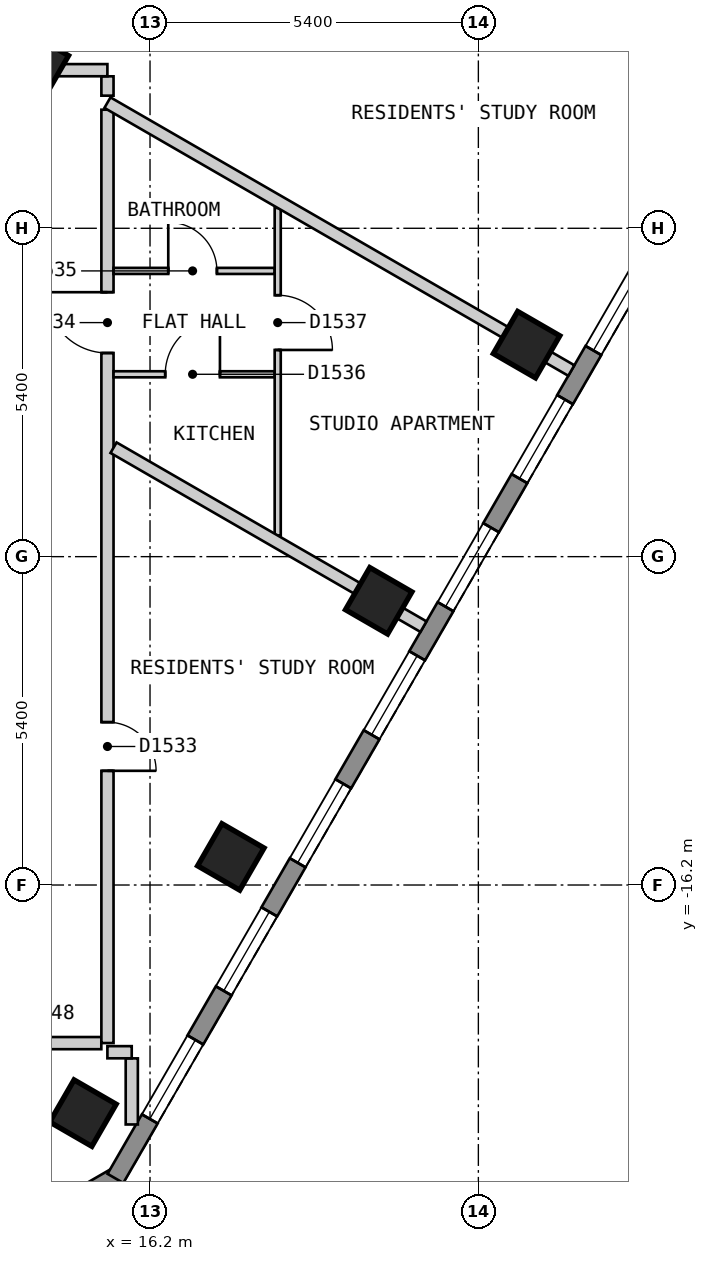
"""IFC4 building model, lengths in metres.
Left out: names, types, materials, properties, quantities, classifications, styles, units other than length and angle.
Written with IfcOpenShell. Run it as: python <this file> out.ifc"""

import sys

from ifc_helpers import new_model, si_unit, direction, frame, frame_2d, origin, origin_2d, place, context, subcontext, project, spatial, polyline, rectangle, outline, extrude, element, fill, save


model = new_model("IFC4")
c1 = context("Model", 3, precision=1e-05, world=origin(), true_north=direction((0.0, 1.0)))
c2 = subcontext(c1, "Body", "Model", "MODEL_VIEW")
j1 = project(units=[si_unit("LENGTHUNIT", "METRE"), si_unit("PLANEANGLEUNIT", "RADIAN")], contexts=[c1])
p1 = place(None, origin())
s1 = spatial("IfcSite", under=j1, at=p1, CompositionType="ELEMENT")
p2 = place(p1, origin())
s2 = spatial("IfcBuilding", under=s1, at=p2, CompositionType="ELEMENT")
p3 = place(p2, frame((0.0, 0.0, 190.2)))
s3 = spatial("IfcBuildingStorey", under=s2, at=p3, CompositionType="ELEMENT", Elevation=190.2)
for number, where, z_axis, x_axis in (
    (1, (15.097, -19.951, 0.0), (0.0, 0.0, 1.0), (0.5, 0.866, 0.0)),
    (2, (17.529, -15.738, 0.0), (0.0, 0.0, 1.0), (0.5, 0.866, 0.0)),
    (3, (19.961, -11.526, 0.0), (0.0, 0.0, 1.0), (0.5, 0.866, 0.0)),
    (4, (22.393, -7.314, 0.0), (0.0, 0.0, 1.0), (0.5, 0.866, 0.0)),
):
    element("IfcColumn", number, at=place(p3, frame(where, z_axis=z_axis, x_axis=x_axis)), inside=s3, PredefinedType="COLUMN", context=c2, shape_type="SweptSolid", body=[
        extrude(rectangle(XDim=0.8, YDim=0.8, at=origin_2d()), origin(), (0.0, 0.0, 1.0), 3.0),
    ])
p4 = place(p3, frame((14.382, -2.689, 0.0), z_axis=(0.0, 0.0, 1.0), x_axis=(0.5, 0.866025403784, 0.0)))
e5 = element("IfcColumn", 5, at=p4, inside=s3, PredefinedType="COLUMN", context=c2, shape_type="SweptSolid", body=[
    extrude(rectangle(XDim=0.7, YDim=0.7, at=origin_2d()), origin(), (0.0, 0.0, 1.0), 3.0),
])
p5 = place(p3, frame((11.356, -23.47, 0.0), z_axis=(0.0, 0.0, 1.0), x_axis=(0.866022959057, 0.500004234368, 0.0)))
e6 = element("IfcWall", 6, at=p5, inside=s3, PredefinedType="SOLIDWALL", context=c2, shape_type="SweptSolid", body=[
    extrude(outline(polyline([(0.0, -0.15), (5.0, -0.15), (4.92, 0.15), (0.08, 0.15), (0.0, -0.15)])), origin(), (0.0, 0.0, 1.0), 2.7),
])
p6 = place(p5, frame((0.65, 0.0, 0.15)))
e7 = element("IfcOpeningElement", 7, at=p6, cuts=e6, PredefinedType="OPENING", context=c2, shape_type="SweptSolid", body=[
    extrude(rectangle(XDim=1.2, YDim=2.1, at=frame_2d((0.6, 1.05))), frame((0.0, 0.16, 0.0), z_axis=(0.0, -1.0, 0.0), x_axis=(1.0, 0.0, 0.0)), (0.0, 0.0, 1.0), 0.32),
])
p7 = place(p5, frame((3.149, 0.0, 0.15)))
e8 = element("IfcOpeningElement", 8, at=p7, cuts=e6, PredefinedType="OPENING", context=c2, shape_type="SweptSolid", body=[
    extrude(rectangle(XDim=1.2, YDim=2.1, at=frame_2d((0.6, 1.05))), frame((0.0, 0.16, 0.0), z_axis=(0.0, -1.0, 0.0), x_axis=(1.0, 0.0, 0.0)), (0.0, 0.0, 1.0), 0.32),
])
p8 = place(p3, frame((15.631, -21.025, 0.0), z_axis=(0.0, 0.0, 1.0), x_axis=(0.500018670445, 0.86601462413, 0.0)))
e9 = element("IfcWall", 9, at=p8, inside=s3, PredefinedType="SOLIDWALL", context=c2, shape_type="SweptSolid", body=[
    extrude(outline(polyline([(0.0, -0.15), (20.785, -0.15), (20.705, 0.15), (0.08, 0.15), (0.0, -0.15)])), origin(), (0.0, 0.0, 1.0), 2.7),
])
p9 = place(p8, frame((1.13, 0.0, 0.15)))
e10 = element("IfcOpeningElement", 10, at=p9, cuts=e9, PredefinedType="OPENING", context=c2, shape_type="SweptSolid", body=[
    extrude(rectangle(XDim=1.5, YDim=2.1, at=frame_2d((0.75, 1.05))), frame((0.0, 0.16, 0.0), z_axis=(0.0, -1.0, 0.0), x_axis=(1.0, 0.0, 0.0)), (0.0, 0.0, 1.0), 0.32),
])
p10 = place(p8, frame((3.562, 0.0, 0.15)))
e11 = element("IfcOpeningElement", 11, at=p10, cuts=e9, PredefinedType="OPENING", context=c2, shape_type="SweptSolid", body=[
    extrude(rectangle(XDim=1.5, YDim=2.1, at=frame_2d((0.75, 1.05))), frame((0.0, 0.16, 0.0), z_axis=(0.0, -1.0, 0.0), x_axis=(1.0, 0.0, 0.0)), (0.0, 0.0, 1.0), 0.32),
])
p11 = place(p8, frame((5.994, 0.0, 0.15)))
e12 = element("IfcOpeningElement", 12, at=p11, cuts=e9, PredefinedType="OPENING", context=c2, shape_type="SweptSolid", body=[
    extrude(rectangle(XDim=1.5, YDim=2.1, at=frame_2d((0.75, 1.05))), frame((0.0, 0.16, 0.0), z_axis=(0.0, -1.0, 0.0), x_axis=(1.0, 0.0, 0.0)), (0.0, 0.0, 1.0), 0.32),
])
p12 = place(p8, frame((8.425, 0.0, 0.15)))
e13 = element("IfcOpeningElement", 13, at=p12, cuts=e9, PredefinedType="OPENING", context=c2, shape_type="SweptSolid", body=[
    extrude(rectangle(XDim=1.5, YDim=2.1, at=frame_2d((0.75, 1.05))), frame((0.0, 0.16, 0.0), z_axis=(0.0, -1.0, 0.0), x_axis=(1.0, 0.0, 0.0)), (0.0, 0.0, 1.0), 0.32),
])
p13 = place(p8, frame((10.857, 0.0, 0.15)))
e14 = element("IfcOpeningElement", 14, at=p13, cuts=e9, PredefinedType="OPENING", context=c2, shape_type="SweptSolid", body=[
    extrude(rectangle(XDim=1.5, YDim=2.1, at=frame_2d((0.75, 1.05))), frame((0.0, 0.16, 0.0), z_axis=(0.0, -1.0, 0.0), x_axis=(1.0, 0.0, 0.0)), (0.0, 0.0, 1.0), 0.32),
])
p14 = place(p8, frame((13.289, 0.0, 0.15)))
e15 = element("IfcOpeningElement", 15, at=p14, cuts=e9, PredefinedType="OPENING", context=c2, shape_type="SweptSolid", body=[
    extrude(rectangle(XDim=1.5, YDim=2.1, at=frame_2d((0.75, 1.05))), frame((0.0, 0.16, 0.0), z_axis=(0.0, -1.0, 0.0), x_axis=(1.0, 0.0, 0.0)), (0.0, 0.0, 1.0), 0.32),
])
p15 = place(p8, frame((15.722, 0.0, 0.15)))
e16 = element("IfcOpeningElement", 16, at=p15, cuts=e9, PredefinedType="OPENING", context=c2, shape_type="SweptSolid", body=[
    extrude(rectangle(XDim=1.5, YDim=2.1, at=frame_2d((0.75, 1.05))), frame((0.0, 0.16, 0.0), z_axis=(0.0, -1.0, 0.0), x_axis=(1.0, 0.0, 0.0)), (0.0, 0.0, 1.0), 0.32),
])
p16 = place(p8, frame((18.154, 0.0, 0.15)))
e17 = element("IfcOpeningElement", 17, at=p16, cuts=e9, PredefinedType="OPENING", context=c2, shape_type="SweptSolid", body=[
    extrude(rectangle(XDim=1.5, YDim=2.1, at=frame_2d((0.75, 1.05))), frame((0.0, 0.16, 0.0), z_axis=(0.0, -1.0, 0.0), x_axis=(1.0, 0.0, 0.0)), (0.0, 0.0, 1.0), 0.32),
])
p17 = place(p3, frame((15.5, -2.901, 0.0), z_axis=(0.0, 0.0, 1.0), x_axis=(0.0, -1.0, 0.0)))
e18 = element("IfcWall", 18, at=p17, inside=s3, PredefinedType="PARTITIONING", context=c2, shape_type="SweptSolid", body=[
    extrude(rectangle(XDim=0.318, YDim=0.2, at=frame_2d((0.159, 0.0))), origin(), (0.0, 0.0, 1.0), 2.7),
])
p18 = place(p3, frame((13.3, -18.8, 0.0), z_axis=(0.0, 0.0, 1.0), x_axis=(1.0, 0.0, 0.0)))
e19 = element("IfcWall", 19, at=p18, inside=s3, PredefinedType="PARTITIONING", context=c2, shape_type="SweptSolid", body=[
    extrude(rectangle(XDim=2.099, YDim=0.2, at=frame_2d((1.049, 0.0))), origin(), (0.0, 0.0, 1.0), 2.7),
])
p19 = place(p18, frame((0.2, 0.0, 0.0)))
e20 = element("IfcOpeningElement", 20, at=p19, cuts=e19, PredefinedType="OPENING", context=c2, shape_type="SweptSolid", body=[
    extrude(rectangle(XDim=1.0, YDim=2.1, at=frame_2d((0.5, 1.05))), frame((0.0, 0.11, 0.0), z_axis=(0.0, -1.0, 0.0), x_axis=(1.0, 0.0, 0.0)), (0.0, 0.0, 1.0), 0.22),
])
p20 = place(p3, frame((14.433, -2.8, 0.0), z_axis=(0.0, 0.0, 1.0), x_axis=(1.0, 0.0, 0.0)))
e21 = element("IfcWall", 21, at=p20, inside=s3, PredefinedType="PARTITIONING", context=c2, shape_type="SweptSolid", body=[
    extrude(rectangle(XDim=1.066, YDim=0.2, at=frame_2d((0.533, 0.0))), origin(), (0.0, 0.0, 1.0), 2.7),
])
p21 = place(p3, frame((14.318, -2.8, 0.0), z_axis=(0.0, 0.0, 1.0), x_axis=(0.49964693309, 0.866229151122, 0.0)))
e22 = element("IfcWall", 22, at=p21, inside=s3, PredefinedType="PARTITIONING", context=c2, shape_type="SweptSolid", body=[
    extrude(rectangle(XDim=2.426, YDim=0.2, at=frame_2d((1.213, 0.0))), origin(), (0.0, 0.0, 1.0), 2.7),
])
p22 = place(p21, frame((0.886, 0.0, 0.0)))
e23 = element("IfcOpeningElement", 23, at=p22, cuts=e22, PredefinedType="OPENING", context=c2, shape_type="SweptSolid", body=[
    extrude(rectangle(XDim=0.8, YDim=2.1, at=frame_2d((0.4, 1.05))), frame((0.0, 0.11, 0.0), z_axis=(0.0, -1.0, 0.0), x_axis=(1.0, 0.0, 0.0)), (0.0, 0.0, 1.0), 0.22),
])
p23 = place(p3, frame((15.5, -18.799, 0.0), z_axis=(0.0, 0.0, 1.0), x_axis=(0.0, 1.0, 0.0)))
e24 = element("IfcWall", 24, at=p23, inside=s3, PredefinedType="PARTITIONING", context=c2, shape_type="SweptSolid", body=[
    extrude(rectangle(XDim=15.349, YDim=0.2, at=frame_2d((7.675, 0.0))), origin(), (0.0, 0.0, 1.0), 2.7),
])
p24 = place(p23, frame((4.477, 0.0, 0.0)))
e25 = element("IfcOpeningElement", 25, at=p24, cuts=e24, PredefinedType="OPENING", context=c2, shape_type="SweptSolid", body=[
    extrude(rectangle(XDim=0.8, YDim=2.1, at=frame_2d((0.4, 1.05))), frame((0.0, 0.11, 0.0), z_axis=(0.0, -1.0, 0.0), x_axis=(1.0, 0.0, 0.0)), (0.0, 0.0, 1.0), 0.22),
])
p25 = place(p23, frame((11.348, 0.0, 0.0)))
e26 = element("IfcOpeningElement", 26, at=p25, cuts=e24, PredefinedType="OPENING", context=c2, shape_type="SweptSolid", body=[
    extrude(rectangle(XDim=1.0, YDim=2.1, at=frame_2d((0.5, 1.05))), frame((0.0, 0.11, 0.0), z_axis=(0.0, -1.0, 0.0), x_axis=(1.0, 0.0, 0.0)), (0.0, 0.0, 1.0), 0.22),
])
p26 = place(p3, frame((15.6, -6.101, 0.0), z_axis=(0.0, 0.0, 1.0), x_axis=(1.0, 0.0, 0.0)))
e27 = element("IfcWall", 27, at=p26, inside=s3, PredefinedType="PARTITIONING", context=c2, shape_type="SweptSolid", body=[
    extrude(rectangle(XDim=2.65, YDim=0.1, at=frame_2d((1.325, 0.0))), origin(), (0.0, 0.0, 1.0), 2.7),
])
p27 = place(p26, frame((0.9, 0.0, 0.0)))
e28 = element("IfcOpeningElement", 28, at=p27, cuts=e27, PredefinedType="OPENING", context=c2, shape_type="SweptSolid", body=[
    extrude(rectangle(XDim=0.8, YDim=2.1, at=frame_2d((0.4, 1.05))), frame((0.0, 0.06, 0.0), z_axis=(0.0, -1.0, 0.0), x_axis=(1.0, 0.0, 0.0)), (0.0, 0.0, 1.0), 0.12),
])
p28 = place(p3, frame((15.6, -7.801, 0.0), z_axis=(0.0, 0.0, 1.0), x_axis=(1.0, 0.0, 0.0)))
e29 = element("IfcWall", 29, at=p28, inside=s3, PredefinedType="PARTITIONING", context=c2, shape_type="SweptSolid", body=[
    extrude(rectangle(XDim=2.65, YDim=0.1, at=frame_2d((1.325, 0.0))), origin(), (0.0, 0.0, 1.0), 2.7),
])
p29 = place(p28, frame((0.85, 0.0, 0.0)))
e30 = element("IfcOpeningElement", 30, at=p29, cuts=e29, PredefinedType="OPENING", context=c2, shape_type="SweptSolid", body=[
    extrude(rectangle(XDim=0.9, YDim=2.1, at=frame_2d((0.45, 1.05))), frame((0.0, 0.06, 0.0), z_axis=(0.0, -1.0, 0.0), x_axis=(1.0, 0.0, 0.0)), (0.0, 0.0, 1.0), 0.12),
])
p30 = place(p3, frame((18.3, -10.452, 0.0), z_axis=(0.0, 0.0, 1.0), x_axis=(0.0, 1.0, 0.0)))
e31 = element("IfcWall", 31, at=p30, inside=s3, PredefinedType="PARTITIONING", context=c2, shape_type="SweptSolid", body=[
    extrude(rectangle(XDim=5.386, YDim=0.1, at=frame_2d((2.693, 0.0))), origin(), (0.0, 0.0, 1.0), 2.7),
])
p31 = place(p30, frame((3.051, 0.0, 0.0)))
e32 = element("IfcOpeningElement", 32, at=p31, cuts=e31, PredefinedType="OPENING", context=c2, shape_type="SweptSolid", body=[
    extrude(rectangle(XDim=0.9, YDim=2.1, at=frame_2d((0.45, 1.05))), frame((0.0, 0.06, 0.0), z_axis=(0.0, -1.0, 0.0), x_axis=(1.0, 0.0, 0.0)), (0.0, 0.0, 1.0), 0.12),
])
p32 = place(p3, frame((15.9, -19.051, 0.0), z_axis=(0.0, 0.0, 1.0), x_axis=(0.0, -1.0, 0.0)))
e33 = element("IfcWall", 33, at=p32, inside=s3, PredefinedType="PARTITIONING", context=c2, shape_type="SweptSolid", body=[
    extrude(rectangle(XDim=1.087, YDim=0.2, at=frame_2d((0.543, 0.0))), origin(), (0.0, 0.0, 1.0), 2.7),
])
p33 = place(p3, frame((15.6, -9.008, 0.0), z_axis=(0.0, 0.0, 1.0), x_axis=(0.866013576751, -0.500020484464, 0.0)))
e34 = element("IfcWall", 34, at=p33, inside=s3, PredefinedType="PARTITIONING", context=c2, shape_type="SweptSolid", body=[
    extrude(rectangle(XDim=5.885, YDim=0.2, at=frame_2d((2.943, 0.0))), origin(), (0.0, 0.0, 1.0), 2.7),
])
p34 = place(p3, frame((15.5, -3.334, 0.0), z_axis=(0.0, 0.0, 1.0), x_axis=(0.866001896501, -0.5000407136, 0.0)))
e35 = element("IfcWall", 35, at=p34, inside=s3, PredefinedType="PARTITIONING", context=c2, shape_type="SweptSolid", body=[
    extrude(rectangle(XDim=8.809, YDim=0.2, at=frame_2d((4.405, 0.0))), origin(), (0.0, 0.0, 1.0), 2.7),
])
p35 = place(p3, frame((15.499, -18.95, 0.0), z_axis=(0.0, 0.0, 1.0), x_axis=(1.0, 0.0, 0.0)))
e36 = element("IfcWall", 36, at=p35, inside=s3, PredefinedType="PARTITIONING", context=c2, shape_type="SweptSolid", body=[
    extrude(rectangle(XDim=0.4, YDim=0.2, at=frame_2d((0.2, 0.0))), origin(), (0.0, 0.0, 1.0), 2.7),
])
p36 = place(p9, origin())
e37 = element("IfcWindow", 37, at=p36, inside=s3, PartitioningType="SINGLE_PANEL", PredefinedType="WINDOW", context=c2, shape_type="SweptSolid", body=[
    extrude(rectangle(XDim=1.5, YDim=2.1, at=frame_2d((0.75, 1.05))), frame((0.0, 0.03, 0.0), z_axis=(0.0, -1.0, 0.0), x_axis=(1.0, 0.0, 0.0)), (0.0, 0.0, 1.0), 0.06),
])
fill(e10, e37)
p37 = place(p10, origin())
e38 = element("IfcWindow", 38, at=p37, inside=s3, PartitioningType="SINGLE_PANEL", PredefinedType="WINDOW", context=c2, shape_type="SweptSolid", body=[
    extrude(rectangle(XDim=1.5, YDim=2.1, at=frame_2d((0.75, 1.05))), frame((0.0, 0.03, 0.0), z_axis=(0.0, -1.0, 0.0), x_axis=(1.0, 0.0, 0.0)), (0.0, 0.0, 1.0), 0.06),
])
fill(e11, e38)
p38 = place(p11, origin())
e39 = element("IfcWindow", 39, at=p38, inside=s3, PartitioningType="SINGLE_PANEL", PredefinedType="WINDOW", context=c2, shape_type="SweptSolid", body=[
    extrude(rectangle(XDim=1.5, YDim=2.1, at=frame_2d((0.75, 1.05))), frame((0.0, 0.03, 0.0), z_axis=(0.0, -1.0, 0.0), x_axis=(1.0, 0.0, 0.0)), (0.0, 0.0, 1.0), 0.06),
])
fill(e12, e39)
p39 = place(p12, origin())
e40 = element("IfcWindow", 40, at=p39, inside=s3, PartitioningType="SINGLE_PANEL", PredefinedType="WINDOW", context=c2, shape_type="SweptSolid", body=[
    extrude(rectangle(XDim=1.5, YDim=2.1, at=frame_2d((0.75, 1.05))), frame((0.0, 0.03, 0.0), z_axis=(0.0, -1.0, 0.0), x_axis=(1.0, 0.0, 0.0)), (0.0, 0.0, 1.0), 0.06),
])
fill(e13, e40)
p40 = place(p13, origin())
e41 = element("IfcWindow", 41, at=p40, inside=s3, PartitioningType="SINGLE_PANEL", PredefinedType="WINDOW", context=c2, shape_type="SweptSolid", body=[
    extrude(rectangle(XDim=1.5, YDim=2.1, at=frame_2d((0.75, 1.05))), frame((0.0, 0.03, 0.0), z_axis=(0.0, -1.0, 0.0), x_axis=(1.0, 0.0, 0.0)), (0.0, 0.0, 1.0), 0.06),
])
fill(e14, e41)
p41 = place(p14, origin())
e42 = element("IfcWindow", 42, at=p41, inside=s3, PartitioningType="SINGLE_PANEL", PredefinedType="WINDOW", context=c2, shape_type="SweptSolid", body=[
    extrude(rectangle(XDim=1.5, YDim=2.1, at=frame_2d((0.75, 1.05))), frame((0.0, 0.03, 0.0), z_axis=(0.0, -1.0, 0.0), x_axis=(1.0, 0.0, 0.0)), (0.0, 0.0, 1.0), 0.06),
])
fill(e15, e42)
p42 = place(p15, origin())
e43 = element("IfcWindow", 43, at=p42, inside=s3, PartitioningType="SINGLE_PANEL", PredefinedType="WINDOW", context=c2, shape_type="SweptSolid", body=[
    extrude(rectangle(XDim=1.5, YDim=2.1, at=frame_2d((0.75, 1.05))), frame((0.0, 0.03, 0.0), z_axis=(0.0, -1.0, 0.0), x_axis=(1.0, 0.0, 0.0)), (0.0, 0.0, 1.0), 0.06),
])
fill(e16, e43)
p43 = place(p24, origin())
e44 = element("IfcDoor", 44, at=p43, inside=s3, OperationType="SINGLE_SWING_LEFT", PredefinedType="DOOR", context=c2, shape_type="SweptSolid", body=[
    extrude(rectangle(XDim=0.8, YDim=2.1, at=frame_2d((0.4, 1.05))), frame((0.0, 0.025, 0.0), z_axis=(0.0, -1.0, 0.0), x_axis=(1.0, 0.0, 0.0)), (0.0, 0.0, 1.0), 0.05),
])
fill(e25, e44)
p44 = place(p25, origin())
e45 = element("IfcDoor", 45, at=p44, inside=s3, OperationType="SINGLE_SWING_RIGHT", PredefinedType="DOOR", context=c2, shape_type="SweptSolid", body=[
    extrude(rectangle(XDim=1.0, YDim=2.1, at=frame_2d((0.5, 1.05))), frame((0.0, 0.025, 0.0), z_axis=(0.0, -1.0, 0.0), x_axis=(1.0, 0.0, 0.0)), (0.0, 0.0, 1.0), 0.05),
])
fill(e26, e45)
p45 = place(p27, origin())
e46 = element("IfcDoor", 46, at=p45, inside=s3, OperationType="SINGLE_SWING_LEFT", PredefinedType="DOOR", context=c2, shape_type="SweptSolid", body=[
    extrude(rectangle(XDim=0.8, YDim=2.1, at=frame_2d((0.4, 1.05))), frame((0.0, 0.025, 0.0), z_axis=(0.0, -1.0, 0.0), x_axis=(1.0, 0.0, 0.0)), (0.0, 0.0, 1.0), 0.05),
])
fill(e28, e46)
p46 = place(p29, origin())
e47 = element("IfcDoor", 47, at=p46, inside=s3, OperationType="SINGLE_SWING_RIGHT", PredefinedType="DOOR", context=c2, shape_type="SweptSolid", body=[
    extrude(rectangle(XDim=0.9, YDim=2.1, at=frame_2d((0.45, 1.05))), frame((0.0, 0.025, 0.0), z_axis=(0.0, -1.0, 0.0), x_axis=(1.0, 0.0, 0.0)), (0.0, 0.0, 1.0), 0.05),
])
fill(e30, e47)
p47 = place(p31, origin())
e48 = element("IfcDoor", 48, at=p47, inside=s3, OperationType="SINGLE_SWING_LEFT", PredefinedType="DOOR", context=c2, shape_type="SweptSolid", body=[
    extrude(rectangle(XDim=0.9, YDim=2.1, at=frame_2d((0.45, 1.05))), frame((0.0, 0.025, 0.0), z_axis=(0.0, -1.0, 0.0), x_axis=(1.0, 0.0, 0.0)), (0.0, 0.0, 1.0), 0.05),
])
fill(e32, e48)
save(model, sys.argv[1])
